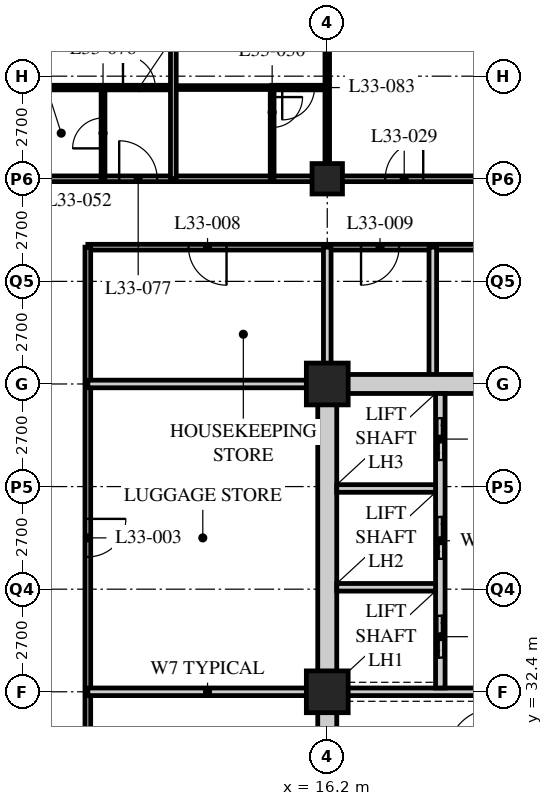
"""IFC4 building model, lengths in metres.
Left out: names, types, materials, properties, quantities, classifications, styles, units other than length and angle.
Written with IfcOpenShell. Run it as: python <this file> out.ifc"""

import sys

from ifc_helpers import new_model, si_unit, direction, frame, frame_2d, origin, origin_2d, place, context, subcontext, project, spatial, rectangle, hollow_rectangle, extrude, element, fill, save


model = new_model("IFC4")
c1 = context("Model", 3, precision=1e-05, world=origin(), true_north=direction((0.0, 1.0)))
c2 = subcontext(c1, "Body", "Model", "MODEL_VIEW")
j1 = project(units=[si_unit("LENGTHUNIT", "METRE"), si_unit("PLANEANGLEUNIT", "RADIAN")], contexts=[c1])
p1 = place(None, origin())
s1 = spatial("IfcSite", under=j1, at=p1, CompositionType="ELEMENT")
p2 = place(p1, origin())
s2 = spatial("IfcBuilding", under=s1, at=p2, CompositionType="ELEMENT")
p3 = place(p2, frame((0.0, 0.0, 130.6)))
s3 = spatial("IfcBuildingStorey", under=s2, at=p3, CompositionType="ELEMENT", Elevation=130.6)
for number, where, z_axis, x_axis in (
    (1, (16.2, 32.4, 0.0), (0.0, 0.0, 1.0), (1.0, 0.0, 0.0)),
    (2, (16.2, 40.5, 0.0), (0.0, 0.0, 1.0), (1.0, 0.0, 0.0)),
):
    element("IfcColumn", number, at=place(p3, frame(where, z_axis=z_axis, x_axis=x_axis)), inside=s3, PredefinedType="COLUMN", context=c2, shape_type="SweptSolid", body=[
        extrude(hollow_rectangle(XDim=1.1, YDim=1.1, WallThickness=0.1, at=origin_2d()), origin(), (0.0, 0.0, 1.0), 3.4),
    ])
p4 = place(p3, frame((16.2, 45.9, 0.0), z_axis=(0.0, 0.0, 1.0), x_axis=(1.0, 0.0, 0.0)))
e3 = element("IfcColumn", 3, at=p4, inside=s3, PredefinedType="COLUMN", context=c2, shape_type="SweptSolid", body=[
    extrude(hollow_rectangle(XDim=0.8, YDim=0.8, WallThickness=0.08, at=origin_2d()), origin(), (0.0, 0.0, 1.0), 3.4),
])
p5 = place(p3, frame((8.1, 45.9, 0.0), z_axis=(0.0, 0.0, 1.0), x_axis=(1.0, 0.0, 0.0)))
e4 = element("IfcWall", 4, at=p5, inside=s3, PredefinedType="PARTITIONING", context=c2, shape_type="SweptSolid", body=[
    extrude(rectangle(XDim=40.5, YDim=0.15, at=frame_2d((20.25, 0.0))), origin(), (0.0, 0.0, 1.0), 2.578),
])
p6 = place(p5, frame((9.625, 0.0, 0.0)))
e5 = element("IfcOpeningElement", 5, at=p6, cuts=e4, PredefinedType="OPENING", context=c2, shape_type="SweptSolid", body=[
    extrude(rectangle(XDim=1.0, YDim=2.1, at=frame_2d((0.5, 1.05))), frame((0.0, 0.085, 0.0), z_axis=(0.0, -1.0, 0.0), x_axis=(1.0, 0.0, 0.0)), (0.0, 0.0, 1.0), 0.17),
])
p7 = place(p5, frame((21.65, 0.0, 0.0)))
e6 = element("IfcOpeningElement", 6, at=p7, cuts=e4, PredefinedType="OPENING", context=c2, shape_type="SweptSolid", body=[
    extrude(rectangle(XDim=1.0, YDim=2.1, at=frame_2d((0.5, 1.05))), frame((0.0, 0.085, 0.0), z_axis=(0.0, -1.0, 0.0), x_axis=(1.0, 0.0, 0.0)), (0.0, 0.0, 1.0), 0.17),
])
p8 = place(p5, frame((26.75, 0.0, 0.0)))
e7 = element("IfcOpeningElement", 7, at=p8, cuts=e4, PredefinedType="OPENING", context=c2, shape_type="SweptSolid", body=[
    extrude(rectangle(XDim=1.0, YDim=2.1, at=frame_2d((0.5, 1.05))), frame((0.0, 0.085, 0.0), z_axis=(0.0, -1.0, 0.0), x_axis=(1.0, 0.0, 0.0)), (0.0, 0.0, 1.0), 0.17),
])
p9 = place(p5, frame((28.95, 0.0, 0.0)))
e8 = element("IfcOpeningElement", 8, at=p9, cuts=e4, PredefinedType="OPENING", context=c2, shape_type="SweptSolid", body=[
    extrude(rectangle(XDim=1.0, YDim=2.1, at=frame_2d((0.5, 1.05))), frame((0.0, 0.085, 0.0), z_axis=(0.0, -1.0, 0.0), x_axis=(1.0, 0.0, 0.0)), (0.0, 0.0, 1.0), 0.17),
])
p10 = place(p5, frame((34.85, 0.0, 0.0)))
e9 = element("IfcOpeningElement", 9, at=p10, cuts=e4, PredefinedType="OPENING", context=c2, shape_type="SweptSolid", body=[
    extrude(rectangle(XDim=1.0, YDim=2.1, at=frame_2d((0.5, 1.05))), frame((0.0, 0.085, 0.0), z_axis=(0.0, -1.0, 0.0), x_axis=(1.0, 0.0, 0.0)), (0.0, 0.0, 1.0), 0.17),
])
p11 = place(p5, frame((36.875, 0.0, 0.0)))
e10 = element("IfcOpeningElement", 10, at=p11, cuts=e4, PredefinedType="OPENING", context=c2, shape_type="SweptSolid", body=[
    extrude(rectangle(XDim=1.0, YDim=2.1, at=frame_2d((0.5, 1.05))), frame((0.0, 0.085, 0.0), z_axis=(0.0, -1.0, 0.0), x_axis=(1.0, 0.0, 0.0)), (0.0, 0.0, 1.0), 0.17),
])
p12 = place(p5, frame((2.625, 0.0, 0.0)))
e11 = element("IfcOpeningElement", 11, at=p12, cuts=e4, PredefinedType="OPENING", context=c2, shape_type="SweptSolid", body=[
    extrude(rectangle(XDim=1.0, YDim=2.1, at=frame_2d((0.5, 1.05))), frame((0.0, 0.085, 0.0), z_axis=(0.0, -1.0, 0.0), x_axis=(1.0, 0.0, 0.0)), (0.0, 0.0, 1.0), 0.17),
])
p13 = place(p3, frame((27.14, 44.1, 0.0), z_axis=(0.0, 0.0, 1.0), x_axis=(-1.0, 0.0, 0.0)))
e12 = element("IfcWall", 12, at=p13, inside=s3, PredefinedType="PARTITIONING", context=c2, shape_type="SweptSolid", body=[
    extrude(rectangle(XDim=17.24, YDim=0.15, at=frame_2d((8.62, 0.0))), origin(), (0.0, 0.0, 1.0), 3.19),
])
p14 = place(p13, frame((13.59, 0.0, 0.0)))
e13 = element("IfcOpeningElement", 13, at=p14, cuts=e12, PredefinedType="OPENING", context=c2, shape_type="SweptSolid", body=[
    extrude(rectangle(XDim=1.0, YDim=2.1, at=frame_2d((0.5, 1.05))), frame((0.0, 0.085, 0.0), z_axis=(0.0, -1.0, 0.0), x_axis=(1.0, 0.0, 0.0)), (0.0, 0.0, 1.0), 0.17),
])
p15 = place(p13, frame((9.051, 0.0, 0.0)))
e14 = element("IfcOpeningElement", 14, at=p15, cuts=e12, PredefinedType="OPENING", context=c2, shape_type="SweptSolid", body=[
    extrude(rectangle(XDim=1.0, YDim=2.1, at=frame_2d((0.5, 1.05))), frame((0.0, 0.085, 0.0), z_axis=(0.0, -1.0, 0.0), x_axis=(1.0, 0.0, 0.0)), (0.0, 0.0, 1.0), 0.17),
])
p16 = place(p13, frame((3.576, 0.0, 0.0)))
e15 = element("IfcOpeningElement", 15, at=p16, cuts=e12, PredefinedType="OPENING", context=c2, shape_type="SweptSolid", body=[
    extrude(rectangle(XDim=1.0, YDim=2.1, at=frame_2d((0.5, 1.05))), frame((0.0, 0.085, 0.0), z_axis=(0.0, -1.0, 0.0), x_axis=(1.0, 0.0, 0.0)), (0.0, 0.0, 1.0), 0.17),
])
p17 = place(p3, frame((9.9, 44.1, 0.0), z_axis=(0.0, 0.0, 1.0), x_axis=(0.0, -1.0, 0.0)))
e16 = element("IfcWall", 16, at=p17, inside=s3, PredefinedType="PARTITIONING", context=c2, shape_type="SweptSolid", body=[
    extrude(rectangle(XDim=19.8, YDim=0.15, at=frame_2d((9.9, 0.0))), origin(), (0.0, 0.0, 1.0), 3.19),
])
p18 = place(p17, frame((18.5, 0.0, 0.0)))
e17 = element("IfcOpeningElement", 17, at=p18, cuts=e16, PredefinedType="OPENING", context=c2, shape_type="SweptSolid", body=[
    extrude(rectangle(XDim=1.0, YDim=2.1, at=frame_2d((0.5, 1.05))), frame((0.0, 0.085, 0.0), z_axis=(0.0, -1.0, 0.0), x_axis=(1.0, 0.0, 0.0)), (0.0, 0.0, 1.0), 0.17),
])
p19 = place(p17, frame((14.45, 0.0, 0.0)))
e18 = element("IfcOpeningElement", 18, at=p19, cuts=e16, PredefinedType="OPENING", context=c2, shape_type="SweptSolid", body=[
    extrude(rectangle(XDim=1.0, YDim=2.1, at=frame_2d((0.5, 1.05))), frame((0.0, 0.085, 0.0), z_axis=(0.0, -1.0, 0.0), x_axis=(1.0, 0.0, 0.0)), (0.0, 0.0, 1.0), 0.17),
])
p20 = place(p17, frame((7.15, 0.0, 0.0)))
e19 = element("IfcOpeningElement", 19, at=p20, cuts=e16, PredefinedType="OPENING", context=c2, shape_type="SweptSolid", body=[
    extrude(rectangle(XDim=1.0, YDim=2.1, at=frame_2d((0.5, 1.05))), frame((0.0, 0.085, 0.0), z_axis=(0.0, -1.0, 0.0), x_axis=(1.0, 0.0, 0.0)), (0.0, 0.0, 1.0), 0.17),
])
p21 = place(p3, frame((9.9, 32.4, 0.0), z_axis=(0.0, 0.0, 1.0), x_axis=(1.0, 0.0, 0.0)))
e20 = element("IfcWall", 20, at=p21, inside=s3, PredefinedType="SOLIDWALL", context=c2, shape_type="SweptSolid", body=[
    extrude(rectangle(XDim=6.3, YDim=0.2, at=frame_2d((3.15, 0.0))), origin(), (0.0, 0.0, 1.0), 3.19),
])
p22 = place(p3, frame((16.2, 40.5, 0.0), z_axis=(0.0, 0.0, 1.0), x_axis=(0.0, 1.0, 0.0)))
e21 = element("IfcWall", 21, at=p22, inside=s3, PredefinedType="SOLIDWALL", context=c2, shape_type="SweptSolid", body=[
    extrude(rectangle(XDim=3.6, YDim=0.2, at=frame_2d((1.8, 0.0))), origin(), (0.0, 0.0, 1.0), 2.578),
])
p23 = place(p3, frame((18.978, 44.1, 0.0), z_axis=(0.0, 0.0, 1.0), x_axis=(0.0, -1.0, 0.0)))
e22 = element("IfcWall", 22, at=p23, inside=s3, PredefinedType="SOLIDWALL", context=c2, shape_type="SweptSolid", body=[
    extrude(rectangle(XDim=3.6, YDim=0.2, at=frame_2d((1.8, 0.0))), origin(), (0.0, 0.0, 1.0), 3.19),
])
p24 = place(p3, frame((9.9, 40.5, 0.0), z_axis=(0.0, 0.0, 1.0), x_axis=(1.0, 0.0, 0.0)))
e23 = element("IfcWall", 23, at=p24, inside=s3, PredefinedType="SOLIDWALL", context=c2, shape_type="SweptSolid", body=[
    extrude(rectangle(XDim=6.3, YDim=0.2, at=frame_2d((3.15, 0.0))), origin(), (0.0, 0.0, 1.0), 3.19),
])
p25 = place(p3, frame((12.15, 48.3, 0.0), z_axis=(0.0, 0.0, 1.0), x_axis=(1.0, 0.0, 0.0)))
e24 = element("IfcWall", 24, at=p25, inside=s3, PredefinedType="PARTITIONING", context=c2, shape_type="SweptSolid", body=[
    extrude(rectangle(XDim=2.6, YDim=0.1, at=frame_2d((1.3, 0.0))), origin(), (0.0, 0.0, 1.0), 3.19),
])
p26 = place(p3, frame((14.75, 45.9, 0.0), z_axis=(0.0, 0.0, 1.0), x_axis=(0.0, 1.0, 0.0)))
e25 = element("IfcWall", 25, at=p26, inside=s3, PredefinedType="PARTITIONING", context=c2, shape_type="SweptSolid", body=[
    extrude(rectangle(XDim=2.4, YDim=0.1, at=frame_2d((1.2, 0.0))), origin(), (0.0, 0.0, 1.0), 3.19),
])
p27 = place(p26, frame((1.35, 0.0, 0.0)))
e26 = element("IfcOpeningElement", 26, at=p27, cuts=e25, PredefinedType="OPENING", context=c2, shape_type="SweptSolid", body=[
    extrude(rectangle(XDim=0.8, YDim=2.1, at=frame_2d((0.4, 1.05))), frame((0.0, 0.06, 0.0), z_axis=(0.0, -1.0, 0.0), x_axis=(1.0, 0.0, 0.0)), (0.0, 0.0, 1.0), 0.12),
])
p28 = place(p3, frame((16.2, 45.9, 0.0), z_axis=(0.0, 0.0, 1.0), x_axis=(0.0, 1.0, 0.0)))
e27 = element("IfcWall", 27, at=p28, inside=s3, PredefinedType="PARTITIONING", context=c2, shape_type="SweptSolid", body=[
    extrude(rectangle(XDim=7.8, YDim=0.12, at=frame_2d((3.9, 0.0))), origin(), (0.0, 0.0, 1.0), 2.578),
])
p29 = place(p28, frame((4.825, 0.0, 0.0)))
e28 = element("IfcOpeningElement", 28, at=p29, cuts=e27, PredefinedType="OPENING", context=c2, shape_type="SweptSolid", body=[
    extrude(rectangle(XDim=0.85, YDim=2.1, at=frame_2d((0.425, 1.05))), frame((0.0, 0.07, 0.0), z_axis=(0.0, -1.0, 0.0), x_axis=(1.0, 0.0, 0.0)), (0.0, 0.0, 1.0), 0.14),
])
p30 = place(p3, frame((8.1, 48.3, 0.0), z_axis=(0.0, 0.0, 1.0), x_axis=(1.0, 0.0, 0.0)))
e29 = element("IfcWall", 29, at=p30, inside=s3, PredefinedType="PARTITIONING", context=c2, shape_type="SweptSolid", body=[
    extrude(rectangle(XDim=4.05, YDim=0.12, at=frame_2d((2.025, 0.0))), origin(), (0.0, 0.0, 1.0), 3.19),
])
p31 = place(p30, frame((2.725, 0.0, 0.0)))
e30 = element("IfcOpeningElement", 30, at=p31, cuts=e29, PredefinedType="OPENING", context=c2, shape_type="SweptSolid", body=[
    extrude(rectangle(XDim=0.85, YDim=2.1, at=frame_2d((0.425, 1.05))), frame((0.0, 0.07, 0.0), z_axis=(0.0, -1.0, 0.0), x_axis=(1.0, 0.0, 0.0)), (0.0, 0.0, 1.0), 0.14),
])
p32 = place(p3, frame((10.3, 45.9, 0.0), z_axis=(0.0, 0.0, 1.0), x_axis=(0.0, 1.0, 0.0)))
e31 = element("IfcWall", 31, at=p32, inside=s3, PredefinedType="PARTITIONING", context=c2, shape_type="SweptSolid", body=[
    extrude(rectangle(XDim=2.4, YDim=0.1, at=frame_2d((1.2, 0.0))), origin(), (0.0, 0.0, 1.0), 3.19),
])
p33 = place(p32, frame((0.8, 0.0, 0.0)))
e32 = element("IfcOpeningElement", 32, at=p33, cuts=e31, PredefinedType="OPENING", context=c2, shape_type="SweptSolid", body=[
    extrude(rectangle(XDim=0.8, YDim=2.1, at=frame_2d((0.4, 1.05))), frame((0.0, 0.06, 0.0), z_axis=(0.0, -1.0, 0.0), x_axis=(1.0, 0.0, 0.0)), (0.0, 0.0, 1.0), 0.12),
])
p34 = place(p3, frame((12.15, 45.9, 0.0), z_axis=(0.0, 0.0, 1.0), x_axis=(0.0, 1.0, 0.0)))
e33 = element("IfcWall", 33, at=p34, inside=s3, PredefinedType="PARTITIONING", context=c2, shape_type="SweptSolid", body=[
    extrude(rectangle(XDim=7.8, YDim=0.15, at=frame_2d((3.9, 0.0))), origin(), (0.0, 0.0, 1.0), 3.19),
])
p35 = place(p3, frame((14.74, 48.3, 0.0), z_axis=(0.0, 0.0, 1.0), x_axis=(1.0, 0.0, 0.0)))
e34 = element("IfcWall", 34, at=p35, inside=s3, PredefinedType="PARTITIONING", context=c2, shape_type="SweptSolid", body=[
    extrude(rectangle(XDim=1.46, YDim=0.12, at=frame_2d((0.73, 0.0))), origin(), (0.0, 0.0, 1.0), 3.19),
])
p36 = place(p35, frame((0.275, 0.0, 0.0)))
e35 = element("IfcOpeningElement", 35, at=p36, cuts=e34, PredefinedType="OPENING", context=c2, shape_type="SweptSolid", body=[
    extrude(rectangle(XDim=0.85, YDim=2.1, at=frame_2d((0.425, 1.05))), frame((0.0, 0.07, 0.0), z_axis=(0.0, -1.0, 0.0), x_axis=(1.0, 0.0, 0.0)), (0.0, 0.0, 1.0), 0.14),
])
p37 = place(p3, frame((15.95, 40.5, 0.0), z_axis=(0.0, 0.0, 1.0), x_axis=(1.0, 0.0, 0.0)))
e36 = element("IfcWall", 36, at=p37, inside=s3, PredefinedType="SOLIDWALL", context=c2, shape_type="SweptSolid", body=[
    extrude(rectangle(XDim=24.8, YDim=0.5, at=frame_2d((12.4, 0.0))), origin(), (0.0, 0.0, 1.0), 2.54),
])
p38 = place(p37, frame((11.5, 0.0, 0.0)))
e37 = element("IfcOpeningElement", 37, at=p38, cuts=e36, PredefinedType="OPENING", context=c2, shape_type="SweptSolid", body=[
    extrude(rectangle(XDim=1.8, YDim=2.4, at=frame_2d((0.9, 1.2))), frame((0.0, 0.26, 0.0), z_axis=(0.0, -1.0, 0.0), x_axis=(1.0, 0.0, 0.0)), (0.0, 0.0, 1.0), 0.52),
])
p39 = place(p3, frame((16.2, 24.55, 0.0), z_axis=(0.0, 0.0, 1.0), x_axis=(0.0, 1.0, 0.0)))
e38 = element("IfcWall", 38, at=p39, inside=s3, PredefinedType="SOLIDWALL", context=c2, shape_type="SweptSolid", body=[
    extrude(rectangle(XDim=15.7, YDim=0.5, at=frame_2d((7.85, 0.0))), origin(), (0.0, 0.0, 1.0), 2.578),
])
p40 = place(p3, frame((16.45, 32.4, 0.0), z_axis=(0.0, 0.0, 1.0), x_axis=(1.0, 0.0, 0.0)))
e39 = element("IfcWall", 39, at=p40, inside=s3, PredefinedType="SOLIDWALL", context=c2, shape_type="SweptSolid", body=[
    extrude(rectangle(XDim=7.95, YDim=0.2, at=frame_2d((3.975, 0.0))), origin(), (0.0, 0.0, 1.0), 2.578),
])
p41 = place(p3, frame((19.175, 32.5, 0.0), z_axis=(0.0, 0.0, 1.0), x_axis=(0.0, 1.0, 0.0)))
e40 = element("IfcWall", 40, at=p41, inside=s3, PredefinedType="SOLIDWALL", context=c2, shape_type="SweptSolid", body=[
    extrude(rectangle(XDim=7.75, YDim=0.25, at=frame_2d((3.875, 0.0))), origin(), (0.0, 0.0, 1.0), 3.19),
])
p42 = place(p41, frame((0.8, 0.0, 0.0)))
e41 = element("IfcOpeningElement", 41, at=p42, cuts=e40, PredefinedType="OPENING", context=c2, shape_type="SweptSolid", body=[
    extrude(rectangle(XDim=1.1, YDim=2.4, at=frame_2d((0.55, 1.2))), frame((0.0, 0.135, 0.0), z_axis=(0.0, -1.0, 0.0), x_axis=(1.0, 0.0, 0.0)), (0.0, 0.0, 1.0), 0.27),
])
p43 = place(p41, frame((3.4, 0.0, 0.0)))
e42 = element("IfcOpeningElement", 42, at=p43, cuts=e40, PredefinedType="OPENING", context=c2, shape_type="SweptSolid", body=[
    extrude(rectangle(XDim=1.1, YDim=2.4, at=frame_2d((0.55, 1.2))), frame((0.0, 0.135, 0.0), z_axis=(0.0, -1.0, 0.0), x_axis=(1.0, 0.0, 0.0)), (0.0, 0.0, 1.0), 0.27),
])
p44 = place(p41, frame((6.0, 0.0, 0.0)))
e43 = element("IfcOpeningElement", 43, at=p44, cuts=e40, PredefinedType="OPENING", context=c2, shape_type="SweptSolid", body=[
    extrude(rectangle(XDim=1.1, YDim=2.4, at=frame_2d((0.55, 1.2))), frame((0.0, 0.135, 0.0), z_axis=(0.0, -1.0, 0.0), x_axis=(1.0, 0.0, 0.0)), (0.0, 0.0, 1.0), 0.27),
])
for number, where, z_axis, x_axis in (
    (44, (16.45, 35.15, 0.0), (0.0, 0.0, 1.0), (1.0, 0.0, 0.0)),
    (45, (16.45, 37.75, 0.0), (0.0, 0.0, 1.0), (1.0, 0.0, 0.0)),
):
    element("IfcWall", number, at=place(p3, frame(where, z_axis=z_axis, x_axis=x_axis)), inside=s3, PredefinedType="SOLIDWALL", context=c2, shape_type="SweptSolid", body=[
        extrude(rectangle(XDim=2.6, YDim=0.2, at=frame_2d((1.3, 0.0))), origin(), (0.0, 0.0, 1.0), 3.19),
    ])
p45 = place(p20, origin())
e46 = element("IfcDoor", 46, at=p45, inside=s3, OperationType="SINGLE_SWING_LEFT", PredefinedType="DOOR", context=c2, shape_type="SweptSolid", body=[
    extrude(rectangle(XDim=1.0, YDim=2.1, at=frame_2d((0.5, 1.05))), frame((0.0, 0.025, 0.0), z_axis=(0.0, -1.0, 0.0), x_axis=(1.0, 0.0, 0.0)), (0.0, 0.0, 1.0), 0.05),
])
fill(e19, e46)
p46 = place(p14, origin())
e47 = element("IfcDoor", 47, at=p46, inside=s3, OperationType="SINGLE_SWING_LEFT", PredefinedType="DOOR", context=c2, shape_type="SweptSolid", body=[
    extrude(rectangle(XDim=1.0, YDim=2.1, at=frame_2d((0.5, 1.05))), frame((0.0, 0.025, 0.0), z_axis=(0.0, -1.0, 0.0), x_axis=(1.0, 0.0, 0.0)), (0.0, 0.0, 1.0), 0.05),
])
fill(e13, e47)
p47 = place(p15, origin())
e48 = element("IfcDoor", 48, at=p47, inside=s3, OperationType="SINGLE_SWING_RIGHT", PredefinedType="DOOR", context=c2, shape_type="SweptSolid", body=[
    extrude(rectangle(XDim=1.0, YDim=2.1, at=frame_2d((0.5, 1.05))), frame((0.0, 0.025, 0.0), z_axis=(0.0, -1.0, 0.0), x_axis=(1.0, 0.0, 0.0)), (0.0, 0.0, 1.0), 0.05),
])
fill(e14, e48)
p48 = place(p6, origin())
e49 = element("IfcDoor", 49, at=p48, inside=s3, OperationType="SINGLE_SWING_RIGHT", PredefinedType="DOOR", context=c2, shape_type="SweptSolid", body=[
    extrude(rectangle(XDim=1.0, YDim=2.1, at=frame_2d((0.5, 1.05))), frame((0.0, 0.025, 0.0), z_axis=(0.0, -1.0, 0.0), x_axis=(1.0, 0.0, 0.0)), (0.0, 0.0, 1.0), 0.05),
])
fill(e5, e49)
p49 = place(p27, origin())
e50 = element("IfcDoor", 50, at=p49, inside=s3, OperationType="SINGLE_SWING_LEFT", PredefinedType="DOOR", context=c2, shape_type="SweptSolid", body=[
    extrude(rectangle(XDim=0.8, YDim=2.1, at=frame_2d((0.4, 1.05))), frame((0.0, 0.025, 0.0), z_axis=(0.0, -1.0, 0.0), x_axis=(1.0, 0.0, 0.0)), (0.0, 0.0, 1.0), 0.05),
])
fill(e26, e50)
p50 = place(p33, origin())
e51 = element("IfcDoor", 51, at=p50, inside=s3, OperationType="SINGLE_SWING_LEFT", PredefinedType="DOOR", context=c2, shape_type="SweptSolid", body=[
    extrude(rectangle(XDim=0.8, YDim=2.1, at=frame_2d((0.4, 1.05))), frame((0.0, 0.025, 0.0), z_axis=(0.0, -1.0, 0.0), x_axis=(1.0, 0.0, 0.0)), (0.0, 0.0, 1.0), 0.05),
])
fill(e32, e51)
p51 = place(p12, origin())
e52 = element("IfcDoor", 52, at=p51, inside=s3, OperationType="SINGLE_SWING_LEFT", PredefinedType="DOOR", context=c2, shape_type="SweptSolid", body=[
    extrude(rectangle(XDim=1.0, YDim=2.1, at=frame_2d((0.5, 1.05))), frame((0.0, 0.025, 0.0), z_axis=(0.0, -1.0, 0.0), x_axis=(1.0, 0.0, 0.0)), (0.0, 0.0, 1.0), 0.05),
])
fill(e11, e52)
p52 = place(p31, origin())
e53 = element("IfcDoor", 53, at=p52, inside=s3, OperationType="SINGLE_SWING_LEFT", PredefinedType="DOOR", context=c2, shape_type="SweptSolid", body=[
    extrude(rectangle(XDim=0.85, YDim=2.1, at=frame_2d((0.425, 1.05))), frame((0.0, 0.025, 0.0), z_axis=(0.0, -1.0, 0.0), x_axis=(1.0, 0.0, 0.0)), (0.0, 0.0, 1.0), 0.05),
])
fill(e30, e53)
p53 = place(p36, origin())
e54 = element("IfcDoor", 54, at=p53, inside=s3, OperationType="SINGLE_SWING_RIGHT", PredefinedType="DOOR", context=c2, shape_type="SweptSolid", body=[
    extrude(rectangle(XDim=0.85, YDim=2.1, at=frame_2d((0.425, 1.05))), frame((0.0, 0.025, 0.0), z_axis=(0.0, -1.0, 0.0), x_axis=(1.0, 0.0, 0.0)), (0.0, 0.0, 1.0), 0.05),
])
fill(e35, e54)
p54 = place(p42, origin())
e55 = element("IfcDoor", 55, at=p54, inside=s3, OperationType="DOUBLE_DOOR_SLIDING", PredefinedType="DOOR", context=c2, shape_type="SweptSolid", body=[
    extrude(rectangle(XDim=1.1, YDim=2.4, at=frame_2d((0.55, 1.2))), frame((0.0, 0.025, 0.0), z_axis=(0.0, -1.0, 0.0), x_axis=(1.0, 0.0, 0.0)), (0.0, 0.0, 1.0), 0.05),
])
fill(e41, e55)
p55 = place(p43, origin())
e56 = element("IfcDoor", 56, at=p55, inside=s3, OperationType="DOUBLE_DOOR_SLIDING", PredefinedType="DOOR", context=c2, shape_type="SweptSolid", body=[
    extrude(rectangle(XDim=1.1, YDim=2.4, at=frame_2d((0.55, 1.2))), frame((0.0, 0.025, 0.0), z_axis=(0.0, -1.0, 0.0), x_axis=(1.0, 0.0, 0.0)), (0.0, 0.0, 1.0), 0.05),
])
fill(e42, e56)
p56 = place(p44, origin())
e57 = element("IfcDoor", 57, at=p56, inside=s3, OperationType="DOUBLE_DOOR_SLIDING", PredefinedType="DOOR", context=c2, shape_type="SweptSolid", body=[
    extrude(rectangle(XDim=1.1, YDim=2.4, at=frame_2d((0.55, 1.2))), frame((0.0, 0.025, 0.0), z_axis=(0.0, -1.0, 0.0), x_axis=(1.0, 0.0, 0.0)), (0.0, 0.0, 1.0), 0.05),
])
fill(e43, e57)
save(model, sys.argv[1])
